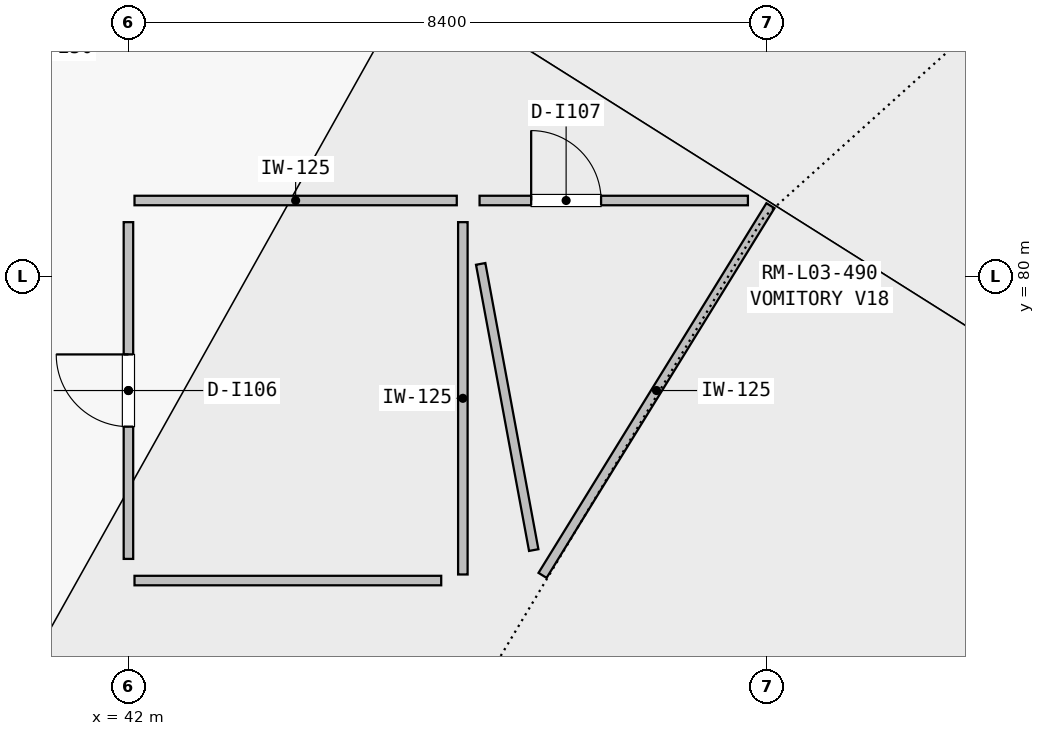
"""IFC4 building model, lengths in metres.
Left out: names, types, materials, properties, quantities, classifications, styles, units other than length and angle.
Written with IfcOpenShell. Run it as: python <this file> out.ifc"""

import sys

from ifc_helpers import new_model, si_unit, direction, frame, frame_2d, origin, place, context, subcontext, project, spatial, rectangle, extrude, element, fill, save


model = new_model("IFC4")
c1 = context("Model", 3, precision=1e-05, world=origin(), true_north=direction((0.0, 1.0)))
c2 = subcontext(c1, "Body", "Model", "MODEL_VIEW")
j1 = project(units=[si_unit("LENGTHUNIT", "METRE"), si_unit("PLANEANGLEUNIT", "RADIAN")], contexts=[c1])
p1 = place(None, origin())
s1 = spatial("IfcSite", under=j1, at=p1, CompositionType="ELEMENT")
p2 = place(p1, origin())
s2 = spatial("IfcBuilding", under=s1, at=p2, CompositionType="ELEMENT")
p3 = place(p2, frame((0.0, 0.0, 14.4)))
s3 = spatial("IfcBuildingStorey", under=s2, at=p3, CompositionType="ELEMENT", Elevation=14.4)
p4 = place(p3, frame((42.08, 81.0, 0.0), z_axis=(0.0, 0.0, 1.0), x_axis=(1.0, 0.0, 0.0)))
e1 = element("IfcWall", 1, at=p4, inside=s3, PredefinedType="PARTITIONING", context=c2, shape_type="SweptSolid", body=[
    extrude(rectangle(XDim=4.24, YDim=0.125, at=frame_2d((2.12, 0.0))), origin(), (0.0, 0.0, 1.0), 2.943),
])
p5 = place(p3, frame((46.4, 80.715, 0.0), z_axis=(0.0, 0.0, 1.0), x_axis=(0.0, -1.0, 0.0)))
e2 = element("IfcWall", 2, at=p5, inside=s3, PredefinedType="PARTITIONING", context=c2, shape_type="SweptSolid", body=[
    extrude(rectangle(XDim=4.635, YDim=0.125, at=frame_2d((2.317, 0.0))), origin(), (0.0, 0.0, 1.0), 4.2),
])
p6 = place(p3, frame((46.115, 76.0, 0.0), z_axis=(0.0, 0.0, 1.0), x_axis=(-1.0, 0.0, 0.0)))
e3 = element("IfcWall", 3, at=p6, inside=s3, PredefinedType="PARTITIONING", context=c2, shape_type="SweptSolid", body=[
    extrude(rectangle(XDim=4.035, YDim=0.125, at=frame_2d((2.018, 0.0))), origin(), (0.0, 0.0, 1.0), 4.2),
])
p7 = place(p3, frame((42.0, 76.285, 0.0), z_axis=(0.0, 0.0, 1.0), x_axis=(0.0, 1.0, 0.0)))
e4 = element("IfcWall", 4, at=p7, inside=s3, PredefinedType="PARTITIONING", context=c2, shape_type="SweptSolid", body=[
    extrude(rectangle(XDim=4.43, YDim=0.125, at=frame_2d((2.215, 0.0))), origin(), (0.0, 0.0, 1.0), 2.943),
])
p8 = place(p7, frame((1.74, 0.0, 0.0)))
e5 = element("IfcOpeningElement", 5, at=p8, cuts=e4, PredefinedType="OPENING", context=c2, shape_type="SweptSolid", body=[
    extrude(rectangle(XDim=0.95, YDim=2.1, at=frame_2d((0.475, 1.05))), frame((0.0, 0.073, 0.0), z_axis=(0.0, -1.0, 0.0), x_axis=(1.0, 0.0, 0.0)), (0.0, 0.0, 1.0), 0.145),
])
p9 = place(p3, frame((50.447, 80.932, 0.0), z_axis=(0.0, 0.0, 1.0), x_axis=(-0.524757645572, -0.851251674544, 0.0)))
e6 = element("IfcWall", 6, at=p9, inside=s3, PredefinedType="PARTITIONING", context=c2, shape_type="SweptSolid", body=[
    extrude(rectangle(XDim=5.714, YDim=0.125, at=frame_2d((2.857, 0.0))), origin(), (0.0, 0.0, 1.0), 4.2),
])
p10 = place(p3, frame((47.333, 76.401, 0.0), z_axis=(0.0, 0.0, 1.0), x_axis=(-0.182278749463, 0.983246895492, 0.0)))
e7 = element("IfcWall", 7, at=p10, inside=s3, PredefinedType="PARTITIONING", context=c2, shape_type="SweptSolid", body=[
    extrude(rectangle(XDim=3.829, YDim=0.125, at=frame_2d((1.915, 0.0))), origin(), (0.0, 0.0, 1.0), 4.2),
])
p11 = place(p3, frame((46.62, 81.0, 0.0), z_axis=(0.0, 0.0, 1.0), x_axis=(1.0, 0.0, 0.0)))
e8 = element("IfcWall", 8, at=p11, inside=s3, PredefinedType="PARTITIONING", context=c2, shape_type="SweptSolid", body=[
    extrude(rectangle(XDim=3.53, YDim=0.125, at=frame_2d((1.765, 0.0))), origin(), (0.0, 0.0, 1.0), 4.2),
])
p12 = place(p11, frame((0.679, 0.0, 0.0)))
e9 = element("IfcOpeningElement", 9, at=p12, cuts=e8, PredefinedType="OPENING", context=c2, shape_type="SweptSolid", body=[
    extrude(rectangle(XDim=0.92, YDim=2.1, at=frame_2d((0.46, 1.05))), frame((0.0, 0.073, 0.0), z_axis=(0.0, -1.0, 0.0), x_axis=(1.0, 0.0, 0.0)), (0.0, 0.0, 1.0), 0.145),
])
p13 = place(p8, origin())
e10 = element("IfcDoor", 10, at=p13, inside=s3, OperationType="SINGLE_SWING_RIGHT", PredefinedType="DOOR", context=c2, shape_type="SweptSolid", body=[
    extrude(rectangle(XDim=0.95, YDim=2.1, at=frame_2d((0.475, 1.05))), frame((0.0, 0.025, 0.0), z_axis=(0.0, -1.0, 0.0), x_axis=(1.0, 0.0, 0.0)), (0.0, 0.0, 1.0), 0.05),
])
fill(e5, e10)
p14 = place(p12, origin())
e11 = element("IfcDoor", 11, at=p14, inside=s3, OperationType="SINGLE_SWING_LEFT", PredefinedType="DOOR", context=c2, shape_type="SweptSolid", body=[
    extrude(rectangle(XDim=0.92, YDim=2.1, at=frame_2d((0.46, 1.05))), frame((0.0, 0.025, 0.0), z_axis=(0.0, -1.0, 0.0), x_axis=(1.0, 0.0, 0.0)), (0.0, 0.0, 1.0), 0.05),
])
fill(e9, e11)
save(model, sys.argv[1])
